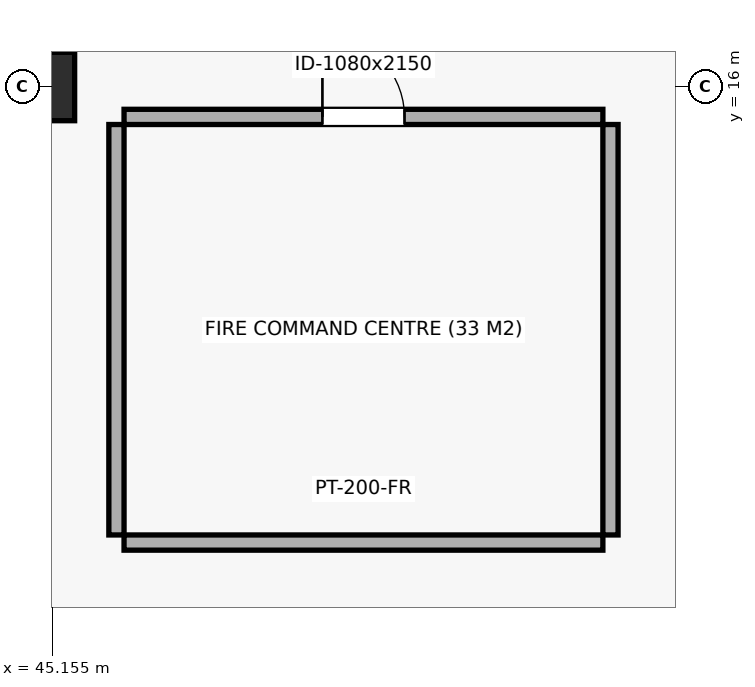
"""IFC4 building model, lengths in metres.
Left out: names, types, materials, properties, quantities, classifications, styles, units other than length and angle.
Written with IfcOpenShell. Run it as: python <this file> out.ifc"""

import sys

from ifc_helpers import new_model, si_unit, direction, frame, frame_2d, origin, origin_2d, place, context, subcontext, project, spatial, rectangle, extrude, element, fill, save


model = new_model("IFC4")
c1 = context("Model", 3, precision=1e-05, world=origin(), true_north=direction((0.0, 1.0)))
c2 = subcontext(c1, "Body", "Model", "MODEL_VIEW")
j1 = project(units=[si_unit("LENGTHUNIT", "METRE"), si_unit("PLANEANGLEUNIT", "RADIAN")], contexts=[c1])
p1 = place(None, origin())
s1 = spatial("IfcSite", under=j1, at=p1, CompositionType="ELEMENT")
p2 = place(p1, origin())
s2 = spatial("IfcBuilding", under=s1, at=p2, CompositionType="ELEMENT")
p3 = place(p2, origin())
s3 = spatial("IfcBuildingStorey", under=s2, at=p3, CompositionType="ELEMENT", Elevation=0.0)
p4 = place(p3, frame((45.0, 16.0, 0.0), z_axis=(0.0, 0.0, 1.0), x_axis=(1.0, 0.0, 0.0)))
e1 = element("IfcColumn", 1, at=p4, inside=s3, PredefinedType="COLUMN", context=c2, shape_type="SweptSolid", body=[
    extrude(rectangle(XDim=0.9, YDim=0.9, at=origin_2d()), origin(), (0.0, 0.0, 1.0), 4.5),
])
p5 = place(p3, frame((46.1, 10.0, 0.0), z_axis=(0.0, 0.0, 1.0), x_axis=(1.0, 0.0, 0.0)))
e2 = element("IfcWall", 2, at=p5, inside=s3, PredefinedType="PARTITIONING", context=c2, shape_type="SweptSolid", body=[
    extrude(rectangle(XDim=6.3, YDim=0.2, at=frame_2d((3.15, 0.0))), origin(), (0.0, 0.0, 1.0), 3.3),
])
p6 = place(p3, frame((46.1, 15.6, 0.0), z_axis=(0.0, 0.0, 1.0), x_axis=(1.0, 0.0, 0.0)))
e3 = element("IfcWall", 3, at=p6, inside=s3, PredefinedType="PARTITIONING", context=c2, shape_type="SweptSolid", body=[
    extrude(rectangle(XDim=6.3, YDim=0.2, at=frame_2d((3.15, 0.0))), origin(), (0.0, 0.0, 1.0), 3.3),
])
p7 = place(p6, frame((2.61, 0.0, 0.0)))
e4 = element("IfcOpeningElement", 4, at=p7, cuts=e3, PredefinedType="OPENING", context=c2, shape_type="SweptSolid", body=[
    extrude(rectangle(XDim=1.08, YDim=2.15, at=frame_2d((0.54, 1.075))), frame((0.0, 0.112, 0.0), z_axis=(0.0, -1.0, 0.0), x_axis=(1.0, 0.0, 0.0)), (0.0, 0.0, 1.0), 0.224),
])
for number, where, z_axis, x_axis in (
    (5, (46.0, 10.1, 0.0), (0.0, 0.0, 1.0), (0.0, 1.0, 0.0)),
    (6, (52.5, 10.1, 0.0), (0.0, 0.0, 1.0), (0.0, 1.0, 0.0)),
):
    element("IfcWall", number, at=place(p3, frame(where, z_axis=z_axis, x_axis=x_axis)), inside=s3, PredefinedType="PARTITIONING", context=c2, shape_type="SweptSolid", body=[
        extrude(rectangle(XDim=5.4, YDim=0.2, at=frame_2d((2.7, 0.0))), origin(), (0.0, 0.0, 1.0), 3.3),
    ])
p8 = place(p7, origin())
e7 = element("IfcDoor", 7, at=p8, inside=s3, OperationType="SINGLE_SWING_LEFT", PredefinedType="DOOR", context=c2, shape_type="SweptSolid", body=[
    extrude(rectangle(XDim=1.08, YDim=2.15, at=frame_2d((0.54, 1.075))), frame((0.0, 0.025, 0.0), z_axis=(0.0, -1.0, 0.0), x_axis=(1.0, 0.0, 0.0)), (0.0, 0.0, 1.0), 0.05),
])
fill(e4, e7)
save(model, sys.argv[1])
